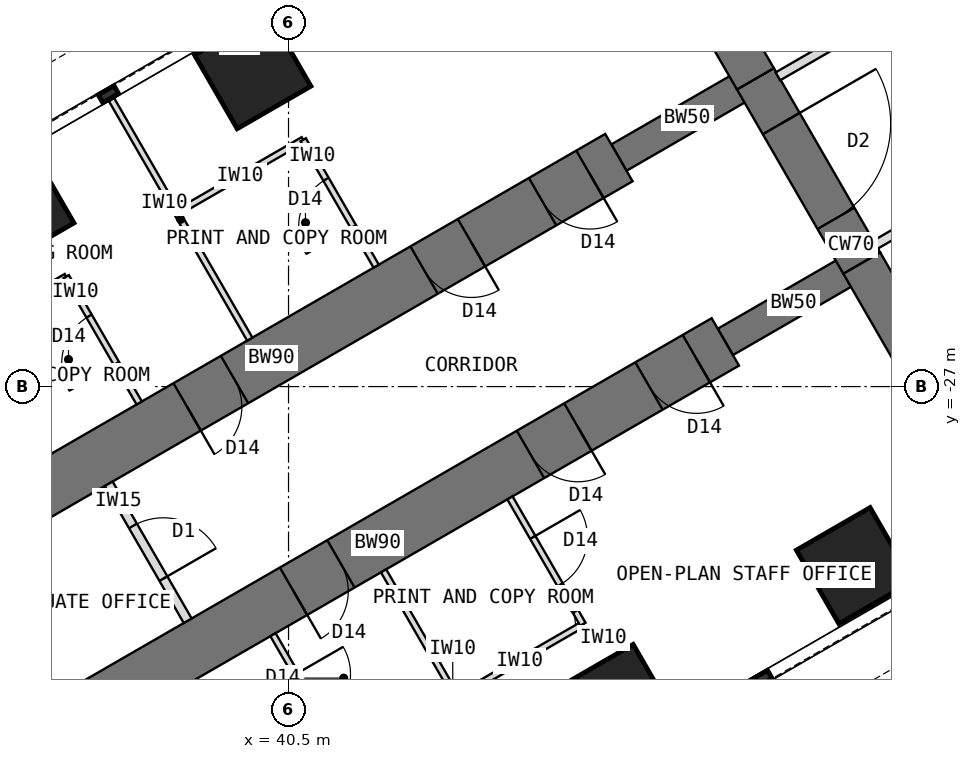
"""IFC4 building model, lengths in metres.
Left out: names, types, materials, properties, quantities, classifications, styles, units other than length and angle.
Written with IfcOpenShell. Run it as: python <this file> out.ifc"""

import sys

from ifc_helpers import new_model, si_unit, direction, frame, frame_2d, origin, origin_2d, place, context, subcontext, project, spatial, rectangle, extrude, element, fill, save


model = new_model("IFC4")
c1 = context("Model", 3, precision=1e-05, world=origin(), true_north=direction((0.0, 1.0)))
c2 = subcontext(c1, "Body", "Model", "MODEL_VIEW")
j1 = project(units=[si_unit("LENGTHUNIT", "METRE"), si_unit("PLANEANGLEUNIT", "RADIAN")], contexts=[c1])
p1 = place(None, origin())
s1 = spatial("IfcSite", under=j1, at=p1, CompositionType="ELEMENT")
p2 = place(p1, origin())
s2 = spatial("IfcBuilding", under=s1, at=p2, CompositionType="ELEMENT")
p3 = place(p2, frame((0.0, 0.0, 76.5)))
s3 = spatial("IfcBuildingStorey", under=s2, at=p3, CompositionType="ELEMENT", Elevation=76.5)
p4 = place(p3, frame((45.904, -18.0, 0.0), z_axis=(0.0, 0.0, 1.0), x_axis=(0.500024481964, -0.866011268655, 0.0)))
e1 = element("IfcWall", 1, at=p4, inside=s3, PredefinedType="SHEAR", context=c2, shape_type="SweptSolid", body=[
    extrude(rectangle(XDim=4.548, YDim=0.7, at=frame_2d((2.274, 0.0))), origin(), (0.0, 0.0, 1.0), 4.0),
])
p5 = place(p3, frame((48.178, -21.939, 0.0), z_axis=(0.0, 0.0, 1.0), x_axis=(0.500010275428, -0.866019471182, 0.0)))
e2 = element("IfcWall", 2, at=p5, inside=s3, PredefinedType="SHEAR", context=c2, shape_type="SweptSolid", body=[
    extrude(rectangle(XDim=3.5, YDim=0.7, at=frame_2d((1.75, 0.0))), origin(), (0.0, 0.0, 1.0), 4.0),
])
p6 = place(p5, frame((0.85, 0.0, 0.0)))
e3 = element("IfcOpeningElement", 3, at=p6, cuts=e2, PredefinedType="OPENING", context=c2, shape_type="SweptSolid", body=[
    extrude(rectangle(XDim=1.8, YDim=2.1, at=frame_2d((0.9, 1.05))), frame((0.0, 0.36, 0.0), z_axis=(0.0, -1.0, 0.0), x_axis=(1.0, 0.0, 0.0)), (0.0, 0.0, 1.0), 0.72),
])
p7 = place(p3, frame((49.928, -24.97, 0.0), z_axis=(0.0, 0.0, 1.0), x_axis=(0.499984222037, -0.866034513004, 0.0)))
e4 = element("IfcWall", 4, at=p7, inside=s3, PredefinedType="SHEAR", context=c2, shape_type="SweptSolid", body=[
    extrude(rectangle(XDim=4.548, YDim=0.7, at=frame_2d((2.274, 0.0))), origin(), (0.0, 0.0, 1.0), 4.0),
])
p8 = place(p3, frame((49.928, -24.97, 0.0), z_axis=(0.0, 0.0, 1.0), x_axis=(-0.866031863473, -0.499988811324, 0.0)))
e5 = element("IfcWall", 5, at=p8, inside=s3, PredefinedType="SHEAR", context=c2, shape_type="SweptSolid", body=[
    extrude(rectangle(XDim=2.592, YDim=0.5, at=frame_2d((1.296, 0.0))), origin(), (0.0, 0.0, 1.0), 4.0),
])
p9 = place(p3, frame((47.684, -26.266, 0.0), z_axis=(0.0, 0.0, 1.0), x_axis=(-0.866027579429, -0.499996231654, 0.0)))
e6 = element("IfcWall", 6, at=p9, inside=s3, PredefinedType="SHEAR", context=c2, shape_type="SweptSolid", body=[
    extrude(rectangle(XDim=13.2, YDim=0.9, at=frame_2d((6.6, 0.0))), origin(), (0.0, 0.0, 1.0), 4.0),
])
p10 = place(p9, frame((0.55, 0.0, 0.0)))
e7 = element("IfcOpeningElement", 7, at=p10, cuts=e6, PredefinedType="OPENING", context=c2, shape_type="SweptSolid", body=[
    extrude(rectangle(XDim=0.9, YDim=2.1, at=frame_2d((0.45, 1.05))), frame((0.0, 0.46, 0.0), z_axis=(0.0, -1.0, 0.0), x_axis=(1.0, 0.0, 0.0)), (0.0, 0.0, 1.0), 0.92),
])
p11 = place(p9, frame((2.8, 0.0, 0.0)))
e8 = element("IfcOpeningElement", 8, at=p11, cuts=e6, PredefinedType="OPENING", context=c2, shape_type="SweptSolid", body=[
    extrude(rectangle(XDim=0.9, YDim=2.1, at=frame_2d((0.45, 1.05))), frame((0.0, 0.46, 0.0), z_axis=(0.0, -1.0, 0.0), x_axis=(1.0, 0.0, 0.0)), (0.0, 0.0, 1.0), 0.92),
])
p12 = place(p9, frame((7.3, 0.0, 0.0)))
e9 = element("IfcOpeningElement", 9, at=p12, cuts=e6, PredefinedType="OPENING", context=c2, shape_type="SweptSolid", body=[
    extrude(rectangle(XDim=0.9, YDim=2.1, at=frame_2d((0.45, 1.05))), frame((0.0, 0.46, 0.0), z_axis=(0.0, -1.0, 0.0), x_axis=(1.0, 0.0, 0.0)), (0.0, 0.0, 1.0), 0.92),
])
p13 = place(p3, frame((48.178, -21.939, 0.0), z_axis=(0.0, 0.0, 1.0), x_axis=(-0.866072649678, -0.499918158782, 0.0)))
e10 = element("IfcWall", 10, at=p13, inside=s3, PredefinedType="SHEAR", context=c2, shape_type="SweptSolid", body=[
    extrude(rectangle(XDim=2.592, YDim=0.5, at=frame_2d((1.296, 0.0))), origin(), (0.0, 0.0, 1.0), 4.0),
])
p14 = place(p3, frame((45.934, -23.234, 0.0), z_axis=(0.0, 0.0, 1.0), x_axis=(-0.866019570528, -0.500010103361, 0.0)))
e11 = element("IfcWall", 11, at=p14, inside=s3, PredefinedType="SHEAR", context=c2, shape_type="SweptSolid", body=[
    extrude(rectangle(XDim=13.2, YDim=0.9, at=frame_2d((6.6, 0.0))), origin(), (0.0, 0.0, 1.0), 4.0),
])
p15 = place(p14, frame((0.55, 0.0, 0.0)))
e12 = element("IfcOpeningElement", 12, at=p15, cuts=e11, PredefinedType="OPENING", context=c2, shape_type="SweptSolid", body=[
    extrude(rectangle(XDim=0.9, YDim=2.1, at=frame_2d((0.45, 1.05))), frame((0.0, 0.46, 0.0), z_axis=(0.0, -1.0, 0.0), x_axis=(1.0, 0.0, 0.0)), (0.0, 0.0, 1.0), 0.92),
])
p16 = place(p14, frame((2.8, 0.0, 0.0)))
e13 = element("IfcOpeningElement", 13, at=p16, cuts=e11, PredefinedType="OPENING", context=c2, shape_type="SweptSolid", body=[
    extrude(rectangle(XDim=0.9, YDim=2.1, at=frame_2d((0.45, 1.05))), frame((0.0, 0.46, 0.0), z_axis=(0.0, -1.0, 0.0), x_axis=(1.0, 0.0, 0.0)), (0.0, 0.0, 1.0), 0.92),
])
p17 = place(p14, frame((7.3, 0.0, 0.0)))
e14 = element("IfcOpeningElement", 14, at=p17, cuts=e11, PredefinedType="OPENING", context=c2, shape_type="SweptSolid", body=[
    extrude(rectangle(XDim=0.9, YDim=2.1, at=frame_2d((0.45, 1.05))), frame((0.0, 0.46, 0.0), z_axis=(0.0, -1.0, 0.0), x_axis=(1.0, 0.0, 0.0)), (0.0, 0.0, 1.0), 0.92),
])
for number, where, z_axis, x_axis in (
    (15, (49.809, -29.946, 0.0), (0.0, 0.0, 1.0), (0.866, 0.5, 0.0)),
    (16, (45.912, -32.196, 0.0), (0.0, 0.0, 1.0), (0.866, 0.5, 0.0)),
    (17, (39.912, -21.804, 0.0), (0.0, 0.0, 1.0), (0.866, 0.5, 0.0)),
    (18, (36.014, -24.054, 0.0), (0.0, 0.0, 1.0), (0.866, 0.5, 0.0)),
):
    element("IfcColumn", number, at=place(p3, frame(where, z_axis=z_axis, x_axis=x_axis)), inside=s3, PredefinedType="COLUMN", context=c2, shape_type="SweptSolid", body=[
        extrude(rectangle(XDim=1.4, YDim=1.4, at=origin_2d()), origin(), (0.0, 0.0, 1.0), 4.0),
    ])
p18 = place(p3, frame((42.063, -30.03, 0.0), z_axis=(0.0, 0.0, 1.0), x_axis=(0.499982560684, -0.866035472144, 0.0)))
e19 = element("IfcWall", 19, at=p18, inside=s3, PredefinedType="PARTITIONING", context=c2, shape_type="SweptSolid", body=[
    extrude(rectangle(XDim=4.55, YDim=0.1, at=frame_2d((2.275, 0.0))), origin(), (0.0, 0.0, 1.0), 3.8),
])
p19 = place(p3, frame((45.342, -30.909, 0.0), z_axis=(0.0, 0.0, 1.0), x_axis=(-0.866050077142, -0.499957262057, 0.0)))
e20 = element("IfcWall", 20, at=p19, inside=s3, PredefinedType="PARTITIONING", context=c2, shape_type="SweptSolid", body=[
    extrude(rectangle(XDim=2.4, YDim=0.1, at=frame_2d((1.2, 0.0))), origin(), (0.0, 0.0, 1.0), 3.8),
])
p20 = place(p3, frame((44.141, -28.83, 0.0), z_axis=(0.0, 0.0, 1.0), x_axis=(0.500077600433, -0.865980596518, 0.0)))
e21 = element("IfcWall", 21, at=p20, inside=s3, PredefinedType="PARTITIONING", context=c2, shape_type="SweptSolid", body=[
    extrude(rectangle(XDim=2.4, YDim=0.1, at=frame_2d((1.2, 0.0))), origin(), (0.0, 0.0, 1.0), 3.8),
])
p21 = place(p20, frame((0.75, 0.0, 0.0)))
e22 = element("IfcOpeningElement", 22, at=p21, cuts=e21, PredefinedType="OPENING", context=c2, shape_type="SweptSolid", body=[
    extrude(rectangle(XDim=0.9, YDim=2.1, at=frame_2d((0.45, 1.05))), frame((0.0, 0.06, 0.0), z_axis=(0.0, -1.0, 0.0), x_axis=(1.0, 0.0, 0.0)), (0.0, 0.0, 1.0), 0.12),
])
p22 = place(p3, frame((40.244, -31.08, 0.0), z_axis=(0.0, 0.0, 1.0), x_axis=(0.500001309137, -0.866024647952, 0.0)))
e23 = element("IfcWall", 23, at=p22, inside=s3, PredefinedType="PARTITIONING", context=c2, shape_type="SweptSolid", body=[
    extrude(rectangle(XDim=2.4, YDim=0.1, at=frame_2d((1.2, 0.0))), origin(), (0.0, 0.0, 1.0), 3.8),
])
p23 = place(p22, frame((0.75, 0.0, 0.0)))
e24 = element("IfcOpeningElement", 24, at=p23, cuts=e23, PredefinedType="OPENING", context=c2, shape_type="SweptSolid", body=[
    extrude(rectangle(XDim=0.9, YDim=2.1, at=frame_2d((0.45, 1.05))), frame((0.0, 0.06, 0.0), z_axis=(0.0, -1.0, 0.0), x_axis=(1.0, 0.0, 0.0)), (0.0, 0.0, 1.0), 0.12),
])
p24 = place(p3, frame((39.863, -26.22, 0.0), z_axis=(0.0, 0.0, 1.0), x_axis=(-0.500022803284, 0.866012237902, 0.0)))
e25 = element("IfcWall", 25, at=p24, inside=s3, PredefinedType="PARTITIONING", context=c2, shape_type="SweptSolid", body=[
    extrude(rectangle(XDim=4.55, YDim=0.1, at=frame_2d((2.275, 0.0))), origin(), (0.0, 0.0, 1.0), 3.8),
])
p25 = place(p3, frame((40.741, -22.941, 0.0), z_axis=(0.0, 0.0, 1.0), x_axis=(-0.865980596518, -0.500077600433, 0.0)))
e26 = element("IfcWall", 26, at=p25, inside=s3, PredefinedType="PARTITIONING", context=c2, shape_type="SweptSolid", body=[
    extrude(rectangle(XDim=2.4, YDim=0.1, at=frame_2d((1.2, 0.0))), origin(), (0.0, 0.0, 1.0), 3.8),
])
p26 = place(p3, frame((41.941, -25.02, 0.0), z_axis=(0.0, 0.0, 1.0), x_axis=(-0.499957262057, 0.866050077142, 0.0)))
e27 = element("IfcWall", 27, at=p26, inside=s3, PredefinedType="PARTITIONING", context=c2, shape_type="SweptSolid", body=[
    extrude(rectangle(XDim=2.4, YDim=0.1, at=frame_2d((1.2, 0.0))), origin(), (0.0, 0.0, 1.0), 3.8),
])
p27 = place(p26, frame((0.75, 0.0, 0.0)))
e28 = element("IfcOpeningElement", 28, at=p27, cuts=e27, PredefinedType="OPENING", context=c2, shape_type="SweptSolid", body=[
    extrude(rectangle(XDim=0.9, YDim=2.1, at=frame_2d((0.45, 1.05))), frame((0.0, 0.06, 0.0), z_axis=(0.0, -1.0, 0.0), x_axis=(1.0, 0.0, 0.0)), (0.0, 0.0, 1.0), 0.12),
])
p28 = place(p3, frame((36.844, -25.191, 0.0), z_axis=(0.0, 0.0, 1.0), x_axis=(-0.865980596518, -0.500077600433, 0.0)))
e29 = element("IfcWall", 29, at=p28, inside=s3, PredefinedType="PARTITIONING", context=c2, shape_type="SweptSolid", body=[
    extrude(rectangle(XDim=2.4, YDim=0.1, at=frame_2d((1.2, 0.0))), origin(), (0.0, 0.0, 1.0), 3.8),
])
p29 = place(p3, frame((38.044, -27.27, 0.0), z_axis=(0.0, 0.0, 1.0), x_axis=(-0.500033551112, 0.866006032174, 0.0)))
e30 = element("IfcWall", 30, at=p29, inside=s3, PredefinedType="PARTITIONING", context=c2, shape_type="SweptSolid", body=[
    extrude(rectangle(XDim=2.4, YDim=0.1, at=frame_2d((1.2, 0.0))), origin(), (0.0, 0.0, 1.0), 3.8),
])
p30 = place(p29, frame((0.75, 0.0, 0.0)))
e31 = element("IfcOpeningElement", 31, at=p30, cuts=e30, PredefinedType="OPENING", context=c2, shape_type="SweptSolid", body=[
    extrude(rectangle(XDim=0.9, YDim=2.1, at=frame_2d((0.45, 1.05))), frame((0.0, 0.06, 0.0), z_axis=(0.0, -1.0, 0.0), x_axis=(1.0, 0.0, 0.0)), (0.0, 0.0, 1.0), 0.12),
])
p31 = place(p3, frame((54.017, -22.436, 0.0), z_axis=(0.0, 0.0, 1.0), x_axis=(-0.866015446554, -0.500017246033, 0.0)))
e32 = element("IfcWall", 32, at=p31, inside=s3, PredefinedType="PARTITIONING", context=c2, shape_type="SweptSolid", body=[
    extrude(rectangle(XDim=4.469, YDim=0.15, at=frame_2d((2.234, 0.0))), origin(), (0.0, 0.0, 1.0), 3.8),
])
p32 = place(p31, frame((1.744, 0.0, 0.0)))
e33 = element("IfcOpeningElement", 33, at=p32, cuts=e32, PredefinedType="OPENING", context=c2, shape_type="SweptSolid", body=[
    extrude(rectangle(XDim=1.0, YDim=2.1, at=frame_2d((0.5, 1.05))), frame((0.0, 0.085, 0.0), z_axis=(0.0, -1.0, 0.0), x_axis=(1.0, 0.0, 0.0)), (0.0, 0.0, 1.0), 0.17),
])
p33 = place(p3, frame((48.548, -21.898, 0.0), z_axis=(0.0, 0.0, 1.0), x_axis=(0.866025445582, 0.499999927604, 0.0)))
e34 = element("IfcWall", 34, at=p33, inside=s3, PredefinedType="PARTITIONING", context=c2, shape_type="SweptSolid", body=[
    extrude(rectangle(XDim=4.468, YDim=0.15, at=frame_2d((2.234, 0.0))), origin(), (0.0, 0.0, 1.0), 3.8),
])
p34 = place(p33, frame((1.724, 0.0, 0.0)))
e35 = element("IfcOpeningElement", 35, at=p34, cuts=e34, PredefinedType="OPENING", context=c2, shape_type="SweptSolid", body=[
    extrude(rectangle(XDim=1.0, YDim=2.1, at=frame_2d((0.5, 1.05))), frame((0.0, 0.085, 0.0), z_axis=(0.0, -1.0, 0.0), x_axis=(1.0, 0.0, 0.0)), (0.0, 0.0, 1.0), 0.17),
])
p35 = place(p3, frame((37.542, -28.599, 0.0), z_axis=(0.0, 0.0, 1.0), x_axis=(0.500006934395, -0.866021400173, 0.0)))
e36 = element("IfcWall", 36, at=p35, inside=s3, PredefinedType="PARTITIONING", context=c2, shape_type="SweptSolid", body=[
    extrude(rectangle(XDim=2.6, YDim=0.15, at=frame_2d((1.3, 0.0))), origin(), (0.0, 0.0, 1.0), 3.8),
])
p36 = place(p35, frame((0.8, 0.0, 0.0)))
e37 = element("IfcOpeningElement", 37, at=p36, cuts=e36, PredefinedType="OPENING", context=c2, shape_type="SweptSolid", body=[
    extrude(rectangle(XDim=1.0, YDim=2.1, at=frame_2d((0.5, 1.05))), frame((0.0, 0.085, 0.0), z_axis=(0.0, -1.0, 0.0), x_axis=(1.0, 0.0, 0.0)), (0.0, 0.0, 1.0), 0.17),
])
p37 = place(p6, origin())
e38 = element("IfcDoor", 38, at=p37, inside=s3, OperationType="DOUBLE_DOOR_DOUBLE_SWING", PredefinedType="DOOR", context=c2, shape_type="SweptSolid", body=[
    extrude(rectangle(XDim=1.72, YDim=2.06, at=frame_2d((0.9, 1.03))), frame((0.0, 0.025, 0.0), z_axis=(0.0, -1.0, 0.0), x_axis=(1.0, 0.0, 0.0)), (0.0, 0.0, 1.0), 0.05),
    extrude(rectangle(XDim=0.04, YDim=2.1, at=frame_2d((0.02, 1.05))), frame((0.0, 0.35, 0.0), z_axis=(0.0, -1.0, 0.0), x_axis=(1.0, 0.0, 0.0)), (0.0, 0.0, 1.0), 0.699),
    extrude(rectangle(XDim=0.04, YDim=2.1, at=frame_2d((1.78, 1.05))), frame((0.0, 0.35, 0.0), z_axis=(0.0, -1.0, 0.0), x_axis=(1.0, 0.0, 0.0)), (0.0, 0.0, 1.0), 0.699),
    extrude(rectangle(XDim=1.72, YDim=0.04, at=frame_2d((0.9, 2.08))), frame((0.0, 0.35, 0.0), z_axis=(0.0, -1.0, 0.0), x_axis=(1.0, 0.0, 0.0)), (0.0, 0.0, 1.0), 0.699),
])
fill(e3, e38)
p38 = place(p21, origin())
e39 = element("IfcDoor", 39, at=p38, inside=s3, OperationType="SINGLE_SWING_LEFT", PredefinedType="DOOR", context=c2, shape_type="SweptSolid", body=[
    extrude(rectangle(XDim=0.9, YDim=2.1, at=frame_2d((0.45, 1.05))), frame((0.0, 0.025, 0.0), z_axis=(0.0, -1.0, 0.0), x_axis=(1.0, 0.0, 0.0)), (0.0, 0.0, 1.0), 0.05),
])
fill(e22, e39)
p39 = place(p23, origin())
e40 = element("IfcDoor", 40, at=p39, inside=s3, OperationType="SINGLE_SWING_LEFT", PredefinedType="DOOR", context=c2, shape_type="SweptSolid", body=[
    extrude(rectangle(XDim=0.9, YDim=2.1, at=frame_2d((0.45, 1.05))), frame((0.0, 0.025, 0.0), z_axis=(0.0, -1.0, 0.0), x_axis=(1.0, 0.0, 0.0)), (0.0, 0.0, 1.0), 0.05),
])
fill(e24, e40)
p40 = place(p27, origin())
e41 = element("IfcDoor", 41, at=p40, inside=s3, OperationType="SINGLE_SWING_LEFT", PredefinedType="DOOR", context=c2, shape_type="SweptSolid", body=[
    extrude(rectangle(XDim=0.9, YDim=2.1, at=frame_2d((0.45, 1.05))), frame((0.0, 0.025, 0.0), z_axis=(0.0, -1.0, 0.0), x_axis=(1.0, 0.0, 0.0)), (0.0, 0.0, 1.0), 0.05),
])
fill(e28, e41)
p41 = place(p30, origin())
e42 = element("IfcDoor", 42, at=p41, inside=s3, OperationType="SINGLE_SWING_LEFT", PredefinedType="DOOR", context=c2, shape_type="SweptSolid", body=[
    extrude(rectangle(XDim=0.9, YDim=2.1, at=frame_2d((0.45, 1.05))), frame((0.0, 0.025, 0.0), z_axis=(0.0, -1.0, 0.0), x_axis=(1.0, 0.0, 0.0)), (0.0, 0.0, 1.0), 0.05),
])
fill(e31, e42)
p42 = place(p36, origin())
e43 = element("IfcDoor", 43, at=p42, inside=s3, OperationType="SINGLE_SWING_RIGHT", PredefinedType="DOOR", context=c2, shape_type="SweptSolid", body=[
    extrude(rectangle(XDim=1.0, YDim=2.1, at=frame_2d((0.5, 1.05))), frame((0.0, 0.025, 0.0), z_axis=(0.0, -1.0, 0.0), x_axis=(1.0, 0.0, 0.0)), (0.0, 0.0, 1.0), 0.05),
])
fill(e37, e43)
p43 = place(p10, origin())
e44 = element("IfcDoor", 44, at=p43, inside=s3, OperationType="SINGLE_SWING_LEFT", PredefinedType="DOOR", context=c2, shape_type="SweptSolid", body=[
    extrude(rectangle(XDim=0.82, YDim=2.06, at=frame_2d((0.45, 1.03))), frame((0.0, 0.025, 0.0), z_axis=(0.0, -1.0, 0.0), x_axis=(1.0, 0.0, 0.0)), (0.0, 0.0, 1.0), 0.05),
    extrude(rectangle(XDim=0.04, YDim=2.1, at=frame_2d((0.02, 1.05))), frame((0.0, 0.45, 0.0), z_axis=(0.0, -1.0, 0.0), x_axis=(1.0, 0.0, 0.0)), (0.0, 0.0, 1.0), 0.899),
    extrude(rectangle(XDim=0.04, YDim=2.1, at=frame_2d((0.88, 1.05))), frame((0.0, 0.45, 0.0), z_axis=(0.0, -1.0, 0.0), x_axis=(1.0, 0.0, 0.0)), (0.0, 0.0, 1.0), 0.899),
    extrude(rectangle(XDim=0.82, YDim=0.04, at=frame_2d((0.45, 2.08))), frame((0.0, 0.45, 0.0), z_axis=(0.0, -1.0, 0.0), x_axis=(1.0, 0.0, 0.0)), (0.0, 0.0, 1.0), 0.899),
])
fill(e7, e44)
p44 = place(p11, origin())
e45 = element("IfcDoor", 45, at=p44, inside=s3, OperationType="SINGLE_SWING_LEFT", PredefinedType="DOOR", context=c2, shape_type="SweptSolid", body=[
    extrude(rectangle(XDim=0.82, YDim=2.06, at=frame_2d((0.45, 1.03))), frame((0.0, 0.025, 0.0), z_axis=(0.0, -1.0, 0.0), x_axis=(1.0, 0.0, 0.0)), (0.0, 0.0, 1.0), 0.05),
    extrude(rectangle(XDim=0.04, YDim=2.1, at=frame_2d((0.02, 1.05))), frame((0.0, 0.45, 0.0), z_axis=(0.0, -1.0, 0.0), x_axis=(1.0, 0.0, 0.0)), (0.0, 0.0, 1.0), 0.899),
    extrude(rectangle(XDim=0.04, YDim=2.1, at=frame_2d((0.88, 1.05))), frame((0.0, 0.45, 0.0), z_axis=(0.0, -1.0, 0.0), x_axis=(1.0, 0.0, 0.0)), (0.0, 0.0, 1.0), 0.899),
    extrude(rectangle(XDim=0.82, YDim=0.04, at=frame_2d((0.45, 2.08))), frame((0.0, 0.45, 0.0), z_axis=(0.0, -1.0, 0.0), x_axis=(1.0, 0.0, 0.0)), (0.0, 0.0, 1.0), 0.899),
])
fill(e8, e45)
p45 = place(p12, origin())
e46 = element("IfcDoor", 46, at=p45, inside=s3, OperationType="SINGLE_SWING_RIGHT", PredefinedType="DOOR", context=c2, shape_type="SweptSolid", body=[
    extrude(rectangle(XDim=0.82, YDim=2.06, at=frame_2d((0.45, 1.03))), frame((0.0, 0.025, 0.0), z_axis=(0.0, -1.0, 0.0), x_axis=(1.0, 0.0, 0.0)), (0.0, 0.0, 1.0), 0.05),
    extrude(rectangle(XDim=0.04, YDim=2.1, at=frame_2d((0.02, 1.05))), frame((0.0, 0.45, 0.0), z_axis=(0.0, -1.0, 0.0), x_axis=(1.0, 0.0, 0.0)), (0.0, 0.0, 1.0), 0.899),
    extrude(rectangle(XDim=0.04, YDim=2.1, at=frame_2d((0.88, 1.05))), frame((0.0, 0.45, 0.0), z_axis=(0.0, -1.0, 0.0), x_axis=(1.0, 0.0, 0.0)), (0.0, 0.0, 1.0), 0.899),
    extrude(rectangle(XDim=0.82, YDim=0.04, at=frame_2d((0.45, 2.08))), frame((0.0, 0.45, 0.0), z_axis=(0.0, -1.0, 0.0), x_axis=(1.0, 0.0, 0.0)), (0.0, 0.0, 1.0), 0.899),
])
fill(e9, e46)
p46 = place(p15, origin())
e47 = element("IfcDoor", 47, at=p46, inside=s3, OperationType="SINGLE_SWING_LEFT", PredefinedType="DOOR", context=c2, shape_type="SweptSolid", body=[
    extrude(rectangle(XDim=0.82, YDim=2.06, at=frame_2d((0.45, 1.03))), frame((0.0, 0.025, 0.0), z_axis=(0.0, -1.0, 0.0), x_axis=(1.0, 0.0, 0.0)), (0.0, 0.0, 1.0), 0.05),
    extrude(rectangle(XDim=0.04, YDim=2.1, at=frame_2d((0.02, 1.05))), frame((0.0, 0.45, 0.0), z_axis=(0.0, -1.0, 0.0), x_axis=(1.0, 0.0, 0.0)), (0.0, 0.0, 1.0), 0.899),
    extrude(rectangle(XDim=0.04, YDim=2.1, at=frame_2d((0.88, 1.05))), frame((0.0, 0.45, 0.0), z_axis=(0.0, -1.0, 0.0), x_axis=(1.0, 0.0, 0.0)), (0.0, 0.0, 1.0), 0.899),
    extrude(rectangle(XDim=0.82, YDim=0.04, at=frame_2d((0.45, 2.08))), frame((0.0, 0.45, 0.0), z_axis=(0.0, -1.0, 0.0), x_axis=(1.0, 0.0, 0.0)), (0.0, 0.0, 1.0), 0.899),
])
fill(e12, e47)
p47 = place(p16, origin())
e48 = element("IfcDoor", 48, at=p47, inside=s3, OperationType="SINGLE_SWING_LEFT", PredefinedType="DOOR", context=c2, shape_type="SweptSolid", body=[
    extrude(rectangle(XDim=0.82, YDim=2.06, at=frame_2d((0.45, 1.03))), frame((0.0, 0.025, 0.0), z_axis=(0.0, -1.0, 0.0), x_axis=(1.0, 0.0, 0.0)), (0.0, 0.0, 1.0), 0.05),
    extrude(rectangle(XDim=0.04, YDim=2.1, at=frame_2d((0.02, 1.05))), frame((0.0, 0.45, 0.0), z_axis=(0.0, -1.0, 0.0), x_axis=(1.0, 0.0, 0.0)), (0.0, 0.0, 1.0), 0.899),
    extrude(rectangle(XDim=0.04, YDim=2.1, at=frame_2d((0.88, 1.05))), frame((0.0, 0.45, 0.0), z_axis=(0.0, -1.0, 0.0), x_axis=(1.0, 0.0, 0.0)), (0.0, 0.0, 1.0), 0.899),
    extrude(rectangle(XDim=0.82, YDim=0.04, at=frame_2d((0.45, 2.08))), frame((0.0, 0.45, 0.0), z_axis=(0.0, -1.0, 0.0), x_axis=(1.0, 0.0, 0.0)), (0.0, 0.0, 1.0), 0.899),
])
fill(e13, e48)
p48 = place(p17, origin())
e49 = element("IfcDoor", 49, at=p48, inside=s3, OperationType="SINGLE_SWING_RIGHT", PredefinedType="DOOR", context=c2, shape_type="SweptSolid", body=[
    extrude(rectangle(XDim=0.82, YDim=2.06, at=frame_2d((0.45, 1.03))), frame((0.0, 0.025, 0.0), z_axis=(0.0, -1.0, 0.0), x_axis=(1.0, 0.0, 0.0)), (0.0, 0.0, 1.0), 0.05),
    extrude(rectangle(XDim=0.04, YDim=2.1, at=frame_2d((0.02, 1.05))), frame((0.0, 0.45, 0.0), z_axis=(0.0, -1.0, 0.0), x_axis=(1.0, 0.0, 0.0)), (0.0, 0.0, 1.0), 0.899),
    extrude(rectangle(XDim=0.04, YDim=2.1, at=frame_2d((0.88, 1.05))), frame((0.0, 0.45, 0.0), z_axis=(0.0, -1.0, 0.0), x_axis=(1.0, 0.0, 0.0)), (0.0, 0.0, 1.0), 0.899),
    extrude(rectangle(XDim=0.82, YDim=0.04, at=frame_2d((0.45, 2.08))), frame((0.0, 0.45, 0.0), z_axis=(0.0, -1.0, 0.0), x_axis=(1.0, 0.0, 0.0)), (0.0, 0.0, 1.0), 0.899),
])
fill(e14, e49)
save(model, sys.argv[1])
